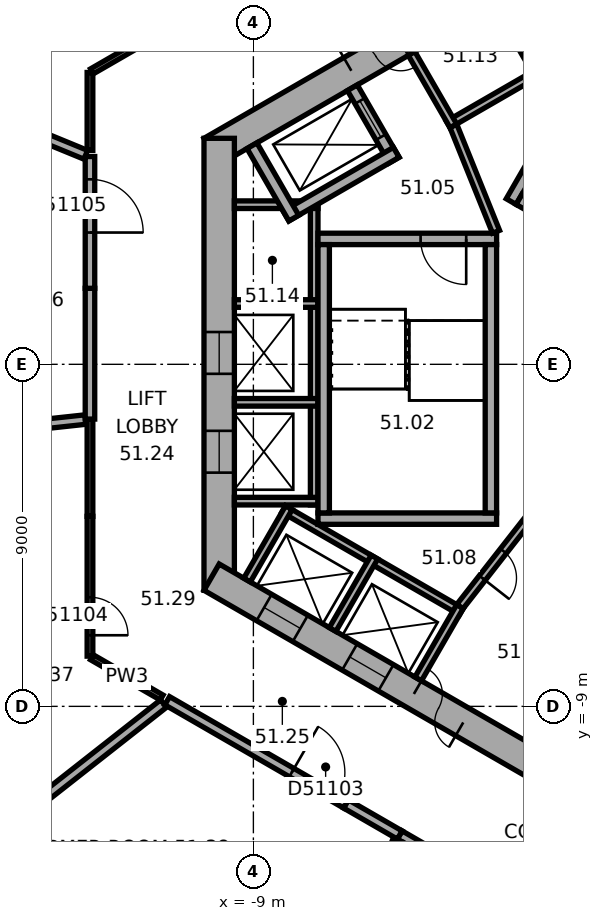
"""IFC4 building model, lengths in metres.
Left out: names, types, materials, properties, quantities, classifications, styles, units other than length and angle.
Written with IfcOpenShell. Run it as: python <this file> out.ifc"""

import sys

from ifc_helpers import new_model, si_unit, direction, frame, frame_2d, origin, place, context, subcontext, project, spatial, rectangle, extrude, element, fill, save


model = new_model("IFC4")
c1 = context("Model", 3, precision=1e-05, world=origin(), true_north=direction((0.0, 1.0)))
c2 = subcontext(c1, "Body", "Model", "MODEL_VIEW")
j1 = project(units=[si_unit("LENGTHUNIT", "METRE"), si_unit("PLANEANGLEUNIT", "RADIAN")], contexts=[c1])
p1 = place(None, origin())
s1 = spatial("IfcSite", under=j1, at=p1, CompositionType="ELEMENT")
p2 = place(p1, origin())
s2 = spatial("IfcBuilding", under=s1, at=p2, CompositionType="ELEMENT")
p3 = place(p2, frame((0.0, 0.0, 205.8)))
s3 = spatial("IfcBuildingStorey", under=s2, at=p3, CompositionType="ELEMENT", Elevation=205.8)
p4 = place(p3, frame((0.2, 11.547, 0.0), z_axis=(0.0, 0.0, 1.0), x_axis=(-0.866023897231, -0.500002609418, 0.0)))
e1 = element("IfcWall", 1, at=p4, inside=s3, PredefinedType="SHEAR", context=c2, shape_type="SweptSolid", body=[
    extrude(rectangle(XDim=11.894, YDim=0.8, at=frame_2d((5.947, 0.0))), origin(), (0.0, 0.0, 1.0), 4.8),
])
p5 = place(p4, frame((6.147, 0.0, 0.0)))
e2 = element("IfcOpeningElement", 2, at=p5, cuts=e1, PredefinedType="OPENING", context=c2, shape_type="SweptSolid", body=[
    extrude(rectangle(XDim=1.5, YDim=2.1, at=frame_2d((0.75, 1.05))), frame((0.0, 0.41, 0.0), z_axis=(0.0, -1.0, 0.0), x_axis=(1.0, 0.0, 0.0)), (0.0, 0.0, 1.0), 0.82),
])
p6 = place(p4, frame((1.697, 0.0, 0.0)))
e3 = element("IfcOpeningElement", 3, at=p6, cuts=e1, PredefinedType="OPENING", context=c2, shape_type="SweptSolid", body=[
    extrude(rectangle(XDim=0.9, YDim=2.1, at=frame_2d((0.45, 1.05))), frame((0.0, 0.41, 0.0), z_axis=(0.0, -1.0, 0.0), x_axis=(1.0, 0.0, 0.0)), (0.0, 0.0, 1.0), 0.82),
])
p7 = place(p4, frame((4.297, 0.0, 0.0)))
e4 = element("IfcOpeningElement", 4, at=p7, cuts=e1, PredefinedType="OPENING", context=c2, shape_type="SweptSolid", body=[
    extrude(rectangle(XDim=0.9, YDim=2.1, at=frame_2d((0.45, 1.05))), frame((0.0, 0.41, 0.0), z_axis=(0.0, -1.0, 0.0), x_axis=(1.0, 0.0, 0.0)), (0.0, 0.0, 1.0), 0.82),
])
p8 = place(p3, frame((-9.9, 5.947, 0.0), z_axis=(0.0, 0.0, 1.0), x_axis=(0.0, -1.0, 0.0)))
e5 = element("IfcWall", 5, at=p8, inside=s3, PredefinedType="SHEAR", context=c2, shape_type="SweptSolid", body=[
    extrude(rectangle(XDim=11.894, YDim=0.8, at=frame_2d((5.947, 0.0))), origin(), (0.0, 0.0, 1.0), 4.8),
])
p9 = place(p8, frame((5.097, 0.0, 0.0)))
e6 = element("IfcOpeningElement", 6, at=p9, cuts=e5, PredefinedType="OPENING", context=c2, shape_type="SweptSolid", body=[
    extrude(rectangle(XDim=1.1, YDim=2.1, at=frame_2d((0.55, 1.05))), frame((0.0, 0.41, 0.0), z_axis=(0.0, -1.0, 0.0), x_axis=(1.0, 0.0, 0.0)), (0.0, 0.0, 1.0), 0.82),
])
p10 = place(p8, frame((7.697, 0.0, 0.0)))
e7 = element("IfcOpeningElement", 7, at=p10, cuts=e5, PredefinedType="OPENING", context=c2, shape_type="SweptSolid", body=[
    extrude(rectangle(XDim=1.1, YDim=2.1, at=frame_2d((0.55, 1.05))), frame((0.0, 0.41, 0.0), z_axis=(0.0, -1.0, 0.0), x_axis=(1.0, 0.0, 0.0)), (0.0, 0.0, 1.0), 0.82),
])
p11 = place(p3, frame((-10.1, -5.6, 0.0), z_axis=(0.0, 0.0, 1.0), x_axis=(0.866023897231, -0.500002609418, 0.0)))
e8 = element("IfcWall", 8, at=p11, inside=s3, PredefinedType="SHEAR", context=c2, shape_type="SweptSolid", body=[
    extrude(rectangle(XDim=11.894, YDim=0.8, at=frame_2d((5.947, 0.0))), origin(), (0.0, 0.0, 1.0), 4.8),
])
p12 = place(p11, frame((6.147, 0.0, 0.0)))
e9 = element("IfcOpeningElement", 9, at=p12, cuts=e8, PredefinedType="OPENING", context=c2, shape_type="SweptSolid", body=[
    extrude(rectangle(XDim=1.5, YDim=2.1, at=frame_2d((0.75, 1.05))), frame((0.0, 0.41, 0.0), z_axis=(0.0, -1.0, 0.0), x_axis=(1.0, 0.0, 0.0)), (0.0, 0.0, 1.0), 0.82),
])
p13 = place(p11, frame((1.597, 0.0, 0.0)))
e10 = element("IfcOpeningElement", 10, at=p13, cuts=e8, PredefinedType="OPENING", context=c2, shape_type="SweptSolid", body=[
    extrude(rectangle(XDim=1.1, YDim=2.1, at=frame_2d((0.55, 1.05))), frame((0.0, 0.41, 0.0), z_axis=(0.0, -1.0, 0.0), x_axis=(1.0, 0.0, 0.0)), (0.0, 0.0, 1.0), 0.82),
])
p14 = place(p11, frame((4.197, 0.0, 0.0)))
e11 = element("IfcOpeningElement", 11, at=p14, cuts=e8, PredefinedType="OPENING", context=c2, shape_type="SweptSolid", body=[
    extrude(rectangle(XDim=1.1, YDim=2.1, at=frame_2d((0.55, 1.05))), frame((0.0, 0.41, 0.0), z_axis=(0.0, -1.0, 0.0), x_axis=(1.0, 0.0, 0.0)), (0.0, 0.0, 1.0), 0.82),
])
p15 = place(p3, frame((0.803, 9.009, 0.0), z_axis=(0.0, 0.0, 1.0), x_axis=(-0.866028230842, -0.499995103361, 0.0)))
e12 = element("IfcWall", 12, at=p15, inside=s3, PredefinedType="PARTITIONING", context=c2, shape_type="SweptSolid", body=[
    extrude(rectangle(XDim=5.4, YDim=0.2, at=frame_2d((2.7, 0.0))), origin(), (0.0, 0.0, 1.0), 4.52),
])
for number, where, z_axis, x_axis in (
    (13, (-1.485, 7.572, 0.0), (0.0, 0.0, 1.0), (-0.5, 0.866, 0.0)),
    (14, (-3.737, 6.272, 0.0), (0.0, 0.0, 1.0), (-0.5, 0.866, 0.0)),
):
    element("IfcWall", number, at=place(p3, frame(where, z_axis=z_axis, x_axis=x_axis)), inside=s3, PredefinedType="PARTITIONING", context=c2, shape_type="SweptSolid", body=[
        extrude(rectangle(XDim=2.2, YDim=0.2, at=frame_2d((1.1, 0.0))), origin(), (0.0, 0.0, 1.0), 4.52),
    ])
p16 = place(p3, frame((-7.4, 4.3, 0.0), z_axis=(0.0, 0.0, 1.0), x_axis=(0.0, -1.0, 0.0)))
e15 = element("IfcWall", 15, at=p16, inside=s3, PredefinedType="PARTITIONING", context=c2, shape_type="SweptSolid", body=[
    extrude(rectangle(XDim=8.0, YDim=0.2, at=frame_2d((4.0, 0.0))), origin(), (0.0, 0.0, 1.0), 4.52),
])
for number, where, z_axis, x_axis in (
    (16, (-7.3, 4.2, 0.0), (0.0, 0.0, 1.0), (-1.0, 0.0, 0.0)),
    (17, (-7.3, 1.6, 0.0), (0.0, 0.0, 1.0), (-1.0, 0.0, 0.0)),
    (18, (-7.3, -1.0, 0.0), (0.0, 0.0, 1.0), (-1.0, 0.0, 0.0)),
    (19, (-7.3, -3.6, 0.0), (0.0, 0.0, 1.0), (-1.0, 0.0, 0.0)),
):
    element("IfcWall", number, at=place(p3, frame(where, z_axis=z_axis, x_axis=x_axis)), inside=s3, PredefinedType="PARTITIONING", context=c2, shape_type="SweptSolid", body=[
        extrude(rectangle(XDim=2.2, YDim=0.2, at=frame_2d((1.1, 0.0))), origin(), (0.0, 0.0, 1.0), 4.52),
    ])
p17 = place(p3, frame((-8.203, -3.809, 0.0), z_axis=(0.0, 0.0, 1.0), x_axis=(0.866028230842, -0.499995103361, 0.0)))
e20 = element("IfcWall", 20, at=p17, inside=s3, PredefinedType="PARTITIONING", context=c2, shape_type="SweptSolid", body=[
    extrude(rectangle(XDim=5.4, YDim=0.2, at=frame_2d((2.7, 0.0))), origin(), (0.0, 0.0, 1.0), 4.52),
])
for number, where, z_axis, x_axis in (
    (21, (-8.067, -3.772, 0.0), (0.0, 0.0, 1.0), (-0.5, -0.866, 0.0)),
    (22, (-5.815, -5.072, 0.0), (0.0, 0.0, 1.0), (-0.5, -0.866, 0.0)),
):
    element("IfcWall", number, at=place(p3, frame(where, z_axis=z_axis, x_axis=x_axis)), inside=s3, PredefinedType="PARTITIONING", context=c2, shape_type="SweptSolid", body=[
        extrude(rectangle(XDim=2.2, YDim=0.2, at=frame_2d((1.1, 0.0))), origin(), (0.0, 0.0, 1.0), 4.52),
    ])
p18 = place(p3, frame((-3.563, -6.372, 0.0), z_axis=(0.0, 0.0, 1.0), x_axis=(-0.499994660107, -0.866028486751, 0.0)))
e23 = element("IfcWall", 23, at=p18, inside=s3, PredefinedType="PARTITIONING", context=c2, shape_type="SweptSolid", body=[
    extrude(rectangle(XDim=2.2, YDim=0.2, at=frame_2d((1.1, 0.0))), origin(), (0.0, 0.0, 1.0), 4.52),
])
p19 = place(p3, frame((-2.216, 4.282, 0.0), z_axis=(0.0, 0.0, 1.0), x_axis=(0.499977259774, 0.866038532462, 0.0)))
e24 = element("IfcWall", 24, at=p19, inside=s3, PredefinedType="SHEAR", context=c2, shape_type="SweptSolid", body=[
    extrude(rectangle(XDim=4.7, YDim=0.3, at=frame_2d((2.35, 0.0))), origin(), (0.0, 0.0, 1.0), 4.52),
])
p20 = place(p3, frame((4.103, 0.807, 0.0), z_axis=(0.0, 0.0, 1.0), x_axis=(-0.866027801685, 0.499995846692, 0.0)))
e25 = element("IfcWall", 25, at=p20, inside=s3, PredefinedType="SHEAR", context=c2, shape_type="SweptSolid", body=[
    extrude(rectangle(XDim=7.06, YDim=0.3, at=frame_2d((3.53, 0.0))), origin(), (0.0, 0.0, 1.0), 4.52),
])
p21 = place(p3, frame((-2.6, 3.3, 0.0), z_axis=(0.0, 0.0, 1.0), x_axis=(-1.0, 0.0, 0.0)))
e26 = element("IfcWall", 26, at=p21, inside=s3, PredefinedType="SHEAR", context=c2, shape_type="SweptSolid", body=[
    extrude(rectangle(XDim=4.7, YDim=0.3, at=frame_2d((2.35, 0.0))), origin(), (0.0, 0.0, 1.0), 4.52),
])
p22 = place(p21, frame((0.8, 0.0, 0.0)))
e27 = element("IfcOpeningElement", 27, at=p22, cuts=e26, PredefinedType="OPENING", context=c2, shape_type="SweptSolid", body=[
    extrude(rectangle(XDim=1.2, YDim=2.1, at=frame_2d((0.6, 1.05))), frame((0.0, 0.16, 0.0), z_axis=(0.0, -1.0, 0.0), x_axis=(1.0, 0.0, 0.0)), (0.0, 0.0, 1.0), 0.32),
])
p23 = place(p3, frame((-2.6, -4.06, 0.0), z_axis=(0.0, 0.0, 1.0), x_axis=(-1.0, 0.0, 0.0)))
e28 = element("IfcWall", 28, at=p23, inside=s3, PredefinedType="SHEAR", context=c2, shape_type="SweptSolid", body=[
    extrude(rectangle(XDim=4.7, YDim=0.3, at=frame_2d((2.35, 0.0))), origin(), (0.0, 0.0, 1.0), 4.52),
])
for number, where, z_axis, x_axis in (
    (29, (-2.75, 3.15, 0.0), (0.0, 0.0, 1.0), (0.0, -1.0, 0.0)),
    (30, (-7.15, 3.15, 0.0), (0.0, 0.0, 1.0), (0.0, -1.0, 0.0)),
):
    element("IfcWall", number, at=place(p3, frame(where, z_axis=z_axis, x_axis=x_axis)), inside=s3, PredefinedType="SHEAR", context=c2, shape_type="SweptSolid", body=[
        extrude(rectangle(XDim=7.06, YDim=0.3, at=frame_2d((3.53, 0.0))), origin(), (0.0, 0.0, 1.0), 4.52),
    ])
p24 = place(p3, frame((-5.295, 5.372, 0.0), z_axis=(0.0, 0.0, 1.0), x_axis=(-0.500077893725, 0.86598042715, 0.0)))
e31 = element("IfcWall", 31, at=p24, inside=s3, PredefinedType="SHEAR", context=c2, shape_type="SweptSolid", body=[
    extrude(rectangle(XDim=2.2, YDim=0.3, at=frame_2d((1.1, 0.0))), origin(), (0.0, 0.0, 1.0), 4.52),
])
p25 = place(p24, frame((0.7, 0.0, 0.0)))
e32 = element("IfcOpeningElement", 32, at=p25, cuts=e31, PredefinedType="OPENING", context=c2, shape_type="SweptSolid", body=[
    extrude(rectangle(XDim=1.1, YDim=2.1, at=frame_2d((0.55, 1.05))), frame((0.0, 0.16, 0.0), z_axis=(0.0, -1.0, 0.0), x_axis=(1.0, 0.0, 0.0)), (0.0, 0.0, 1.0), 0.32),
])
p26 = place(p3, frame((-5.24, 5.577, 0.0), z_axis=(0.0, 0.0, 1.0), x_axis=(-0.866014461049, -0.500018952895, 0.0)))
e33 = element("IfcWall", 33, at=p26, inside=s3, PredefinedType="SHEAR", context=c2, shape_type="SweptSolid", body=[
    extrude(rectangle(XDim=3.35, YDim=0.3, at=frame_2d((1.675, 0.0))), origin(), (0.0, 0.0, 1.0), 4.52),
])
p27 = place(p3, frame((-7.937, 3.847, 0.0), z_axis=(0.0, 0.0, 1.0), x_axis=(-0.50002983664, 0.866008176907, 0.0)))
e34 = element("IfcWall", 34, at=p27, inside=s3, PredefinedType="SHEAR", context=c2, shape_type="SweptSolid", body=[
    extrude(rectangle(XDim=2.2, YDim=0.3, at=frame_2d((1.1, 0.0))), origin(), (0.0, 0.0, 1.0), 4.52),
])
p28 = place(p3, frame((-2.615, 3.487, 0.0), z_axis=(0.0, 0.0, 1.0), x_axis=(-0.373576831041, 0.92759924068, 0.0)))
e35 = element("IfcWall", 35, at=p28, inside=s3, PredefinedType="PARTITIONING", context=c2, shape_type="SweptSolid", body=[
    extrude(rectangle(XDim=3.002, YDim=0.2, at=frame_2d((1.501, 0.0))), origin(), (0.0, 0.0, 1.0), 4.52),
])
p29 = place(p3, frame((-1.712, -4.008, 0.0), z_axis=(0.0, 0.0, 1.0), x_axis=(-0.616549420702, -0.787316208287, 0.0)))
e36 = element("IfcWall", 36, at=p29, inside=s3, PredefinedType="PARTITIONING", context=c2, shape_type="SweptSolid", body=[
    extrude(rectangle(XDim=3.002, YDim=0.2, at=frame_2d((1.501, 0.0))), origin(), (0.0, 0.0, 1.0), 4.52),
])
p30 = place(p29, frame((1.15, 0.0, 0.0)))
e37 = element("IfcOpeningElement", 37, at=p30, cuts=e36, PredefinedType="OPENING", context=c2, shape_type="SweptSolid", body=[
    extrude(rectangle(XDim=0.9, YDim=2.1, at=frame_2d((0.45, 1.05))), frame((0.0, 0.11, 0.0), z_axis=(0.0, -1.0, 0.0), x_axis=(1.0, 0.0, 0.0)), (0.0, 0.0, 1.0), 0.22),
])
p31 = place(p3, frame((-0.087, -15.308, 0.0), z_axis=(0.0, 0.0, 1.0), x_axis=(-0.866016588558, 0.50001526811, 0.0)))
e38 = element("IfcWall", 38, at=p31, inside=s3, PredefinedType="SOLIDWALL", context=c2, shape_type="SweptSolid", body=[
    extrude(rectangle(XDim=5.846, YDim=0.25, at=frame_2d((2.923, 0.0))), origin(), (0.0, 0.0, 1.0), 4.52),
])
p32 = place(p31, frame((0.55, 0.0, 0.0)))
e39 = element("IfcOpeningElement", 39, at=p32, cuts=e38, PredefinedType="OPENING", context=c2, shape_type="SweptSolid", body=[
    extrude(rectangle(XDim=1.4, YDim=2.1, at=frame_2d((0.7, 1.05))), frame((0.0, 0.135, 0.0), z_axis=(0.0, -1.0, 0.0), x_axis=(1.0, 0.0, 0.0)), (0.0, 0.0, 1.0), 0.27),
])
p33 = place(p3, frame((-5.203, -12.514, 0.0), z_axis=(0.0, 0.0, 1.0), x_axis=(-0.383964269763, -0.923347951503, 0.0)))
e40 = element("IfcWall", 40, at=p33, inside=s3, PredefinedType="SOLIDWALL", context=c2, shape_type="SweptSolid", body=[
    extrude(rectangle(XDim=6.577, YDim=0.25, at=frame_2d((3.289, 0.0))), origin(), (0.0, 0.0, 1.0), 3.6),
])
p34 = place(p3, frame((-6.563, -11.568, 0.0), z_axis=(0.0, 0.0, 1.0), x_axis=(0.866026229868, -0.499998569178, 0.0)))
e41 = element("IfcWall", 41, at=p34, inside=s3, PredefinedType="SOLIDWALL", context=c2, shape_type="SweptSolid", body=[
    extrude(rectangle(XDim=1.633, YDim=0.25, at=frame_2d((0.816, 0.0))), origin(), (0.0, 0.0, 1.0), 4.52),
])
p35 = place(p3, frame((-11.363, -8.926, 0.0), z_axis=(0.0, 0.0, 1.0), x_axis=(-0.786388390319, -0.617732385075, 0.0)))
e42 = element("IfcWall", 42, at=p35, inside=s3, PredefinedType="SOLIDWALL", context=c2, shape_type="SweptSolid", body=[
    extrude(rectangle(XDim=4.716, YDim=0.25, at=frame_2d((2.358, 0.0))), origin(), (0.0, 0.0, 1.0), 3.6),
])
p36 = place(p3, frame((-11.269, -8.852, 0.0), z_axis=(0.0, 0.0, 1.0), x_axis=(0.866019457076, -0.500010299859, 0.0)))
e43 = element("IfcWall", 43, at=p36, inside=s3, PredefinedType="SOLIDWALL", context=c2, shape_type="SweptSolid", body=[
    extrude(rectangle(XDim=5.433, YDim=0.25, at=frame_2d((2.717, 0.0))), origin(), (0.0, 0.0, 1.0), 4.52),
])
p37 = place(p36, frame((3.783, 0.0, 0.0)))
e44 = element("IfcOpeningElement", 44, at=p37, cuts=e43, PredefinedType="OPENING", context=c2, shape_type="SweptSolid", body=[
    extrude(rectangle(XDim=1.4, YDim=2.1, at=frame_2d((0.7, 1.05))), frame((0.0, 0.135, 0.0), z_axis=(0.0, -1.0, 0.0), x_axis=(1.0, 0.0, 0.0)), (0.0, 0.0, 1.0), 0.27),
])
p38 = place(p3, frame((-13.248, -7.709, 0.0), z_axis=(0.0, 0.0, 1.0), x_axis=(0.866093487018, -0.499882057835, 0.0)))
e45 = element("IfcWall", 45, at=p38, inside=s3, PredefinedType="PARTITIONING", context=c2, shape_type="SweptSolid", body=[
    extrude(rectangle(XDim=2.119, YDim=0.15, at=frame_2d((1.059, 0.0))), origin(), (0.0, 0.0, 1.0), 4.52),
])
p39 = place(p3, frame((-13.3, -7.679, 0.0), z_axis=(0.0, 0.0, 1.0), x_axis=(0.0, 1.0, 0.0)))
e46 = element("IfcWall", 46, at=p39, inside=s3, PredefinedType="PARTITIONING", context=c2, shape_type="SweptSolid", body=[
    extrude(rectangle(XDim=3.679, YDim=0.15, at=frame_2d((1.839, 0.0))), origin(), (0.0, 0.0, 1.0), 4.52),
])
p40 = place(p39, frame((0.55, 0.0, 0.0)))
e47 = element("IfcOpeningElement", 47, at=p40, cuts=e46, PredefinedType="OPENING", context=c2, shape_type="SweptSolid", body=[
    extrude(rectangle(XDim=1.0, YDim=2.1, at=frame_2d((0.5, 1.05))), frame((0.0, 0.085, 0.0), z_axis=(0.0, -1.0, 0.0), x_axis=(1.0, 0.0, 0.0)), (0.0, 0.0, 1.0), 0.17),
])
p41 = place(p3, frame((-13.3, -4.0, 0.0), z_axis=(0.0, 0.0, 1.0), x_axis=(0.0, 1.0, 0.0)))
e48 = element("IfcWall", 48, at=p41, inside=s3, PredefinedType="PARTITIONING", context=c2, shape_type="SweptSolid", body=[
    extrude(rectangle(XDim=2.56, YDim=0.15, at=frame_2d((1.28, 0.0))), origin(), (0.0, 0.0, 1.0), 4.52),
])
p42 = place(p3, frame((-14.501, -1.571, 0.0), z_axis=(0.0, 0.0, 1.0), x_axis=(0.994183696144, 0.107697624498, 0.0)))
e49 = element("IfcWall", 49, at=p42, inside=s3, PredefinedType="SOLIDWALL", context=c2, shape_type="SweptSolid", body=[
    extrude(rectangle(XDim=1.088, YDim=0.25, at=frame_2d((0.544, 0.0))), origin(), (0.0, 0.0, 1.0), 3.6),
])
p43 = place(p3, frame((-13.3, -1.44, 0.0), z_axis=(0.0, 0.0, 1.0), x_axis=(0.0, 1.0, 0.0)))
e50 = element("IfcWall", 50, at=p43, inside=s3, PredefinedType="SOLIDWALL", context=c2, shape_type="SweptSolid", body=[
    extrude(rectangle(XDim=3.44, YDim=0.25, at=frame_2d((1.72, 0.0))), origin(), (0.0, 0.0, 1.0), 4.52),
])
p44 = place(p3, frame((-13.3, 2.0, 0.0), z_axis=(0.0, 0.0, 1.0), x_axis=(0.0, 1.0, 0.0)))
e51 = element("IfcWall", 51, at=p44, inside=s3, PredefinedType="SOLIDWALL", context=c2, shape_type="SweptSolid", body=[
    extrude(rectangle(XDim=3.468, YDim=0.25, at=frame_2d((1.734, 0.0))), origin(), (0.0, 0.0, 1.0), 4.52),
])
p45 = place(p44, frame((1.468, 0.0, 0.0)))
e52 = element("IfcOpeningElement", 52, at=p45, cuts=e51, PredefinedType="OPENING", context=c2, shape_type="SweptSolid", body=[
    extrude(rectangle(XDim=1.4, YDim=2.1, at=frame_2d((0.7, 1.05))), frame((0.0, 0.135, 0.0), z_axis=(0.0, -1.0, 0.0), x_axis=(1.0, 0.0, 0.0)), (0.0, 0.0, 1.0), 0.27),
])
p46 = place(p3, frame((-13.3, 5.627, 0.0), z_axis=(0.0, 0.0, 1.0), x_axis=(0.0, 1.0, 0.0)))
e53 = element("IfcWall", 53, at=p46, inside=s3, PredefinedType="PARTITIONING", context=c2, shape_type="SweptSolid", body=[
    extrude(rectangle(XDim=2.052, YDim=0.15, at=frame_2d((1.026, 0.0))), origin(), (0.0, 0.0, 1.0), 4.52),
])
p47 = place(p3, frame((-15.809, 6.499, 0.0), z_axis=(0.0, 0.0, 1.0), x_axis=(0.924968398932, -0.380044025052, 0.0)))
e54 = element("IfcWall", 54, at=p47, inside=s3, PredefinedType="SOLIDWALL", context=c2, shape_type="SweptSolid", body=[
    extrude(rectangle(XDim=2.593, YDim=0.25, at=frame_2d((1.296, 0.0))), origin(), (0.0, 0.0, 1.0), 3.6),
])
p48 = place(p3, frame((-8.15, 10.652, 0.0), z_axis=(0.0, 0.0, 1.0), x_axis=(-0.866047461757, -0.499961792524, 0.0)))
e55 = element("IfcWall", 55, at=p48, inside=s3, PredefinedType="PARTITIONING", context=c2, shape_type="SweptSolid", body=[
    extrude(rectangle(XDim=5.887, YDim=0.15, at=frame_2d((2.943, 0.0))), origin(), (0.0, 0.0, 1.0), 4.52),
])
p49 = place(p48, frame((0.65, 0.0, 0.0)))
e56 = element("IfcOpeningElement", 56, at=p49, cuts=e55, PredefinedType="OPENING", context=c2, shape_type="SweptSolid", body=[
    extrude(rectangle(XDim=1.0, YDim=2.1, at=frame_2d((0.5, 1.05))), frame((0.0, 0.085, 0.0), z_axis=(0.0, -1.0, 0.0), x_axis=(1.0, 0.0, 0.0)), (0.0, 0.0, 1.0), 0.17),
])
p50 = place(p5, origin())
e57 = element("IfcDoor", 57, at=p50, inside=s3, OperationType="DOUBLE_DOOR_SINGLE_SWING", PredefinedType="DOOR", context=c2, shape_type="SweptSolid", body=[
    extrude(rectangle(XDim=1.5, YDim=2.1, at=frame_2d((0.75, 1.05))), frame((0.0, 0.025, 0.0), z_axis=(0.0, -1.0, 0.0), x_axis=(1.0, 0.0, 0.0)), (0.0, 0.0, 1.0), 0.05),
])
fill(e2, e57)
p51 = place(p12, origin())
e58 = element("IfcDoor", 58, at=p51, inside=s3, OperationType="DOUBLE_DOOR_SINGLE_SWING", PredefinedType="DOOR", context=c2, shape_type="SweptSolid", body=[
    extrude(rectangle(XDim=1.5, YDim=2.1, at=frame_2d((0.75, 1.05))), frame((0.0, 0.025, 0.0), z_axis=(0.0, -1.0, 0.0), x_axis=(1.0, 0.0, 0.0)), (0.0, 0.0, 1.0), 0.05),
])
fill(e9, e58)
p52 = place(p22, origin())
e59 = element("IfcDoor", 59, at=p52, inside=s3, OperationType="SINGLE_SWING_RIGHT", PredefinedType="DOOR", context=c2, shape_type="SweptSolid", body=[
    extrude(rectangle(XDim=1.2, YDim=2.1, at=frame_2d((0.6, 1.05))), frame((0.0, 0.025, 0.0), z_axis=(0.0, -1.0, 0.0), x_axis=(1.0, 0.0, 0.0)), (0.0, 0.0, 1.0), 0.05),
])
fill(e27, e59)
p53 = place(p30, origin())
e60 = element("IfcDoor", 60, at=p53, inside=s3, OperationType="SINGLE_SWING_LEFT", PredefinedType="DOOR", context=c2, shape_type="SweptSolid", body=[
    extrude(rectangle(XDim=0.9, YDim=2.1, at=frame_2d((0.45, 1.05))), frame((0.0, 0.025, 0.0), z_axis=(0.0, -1.0, 0.0), x_axis=(1.0, 0.0, 0.0)), (0.0, 0.0, 1.0), 0.05),
])
fill(e37, e60)
p54 = place(p25, origin())
e61 = element("IfcDoor", 61, at=p54, inside=s3, OperationType="DOUBLE_DOOR_SLIDING", PredefinedType="DOOR", context=c2, shape_type="SweptSolid", body=[
    extrude(rectangle(XDim=1.1, YDim=2.1, at=frame_2d((0.55, 1.05))), frame((0.0, 0.025, 0.0), z_axis=(0.0, -1.0, 0.0), x_axis=(1.0, 0.0, 0.0)), (0.0, 0.0, 1.0), 0.05),
])
fill(e32, e61)
p55 = place(p9, origin())
e62 = element("IfcDoor", 62, at=p55, inside=s3, OperationType="DOUBLE_DOOR_SLIDING", PredefinedType="DOOR", context=c2, shape_type="SweptSolid", body=[
    extrude(rectangle(XDim=1.1, YDim=2.1, at=frame_2d((0.55, 1.05))), frame((0.0, 0.025, 0.0), z_axis=(0.0, -1.0, 0.0), x_axis=(1.0, 0.0, 0.0)), (0.0, 0.0, 1.0), 0.05),
])
fill(e6, e62)
p56 = place(p10, origin())
e63 = element("IfcDoor", 63, at=p56, inside=s3, OperationType="DOUBLE_DOOR_SLIDING", PredefinedType="DOOR", context=c2, shape_type="SweptSolid", body=[
    extrude(rectangle(XDim=1.1, YDim=2.1, at=frame_2d((0.55, 1.05))), frame((0.0, 0.025, 0.0), z_axis=(0.0, -1.0, 0.0), x_axis=(1.0, 0.0, 0.0)), (0.0, 0.0, 1.0), 0.05),
])
fill(e7, e63)
p57 = place(p13, origin())
e64 = element("IfcDoor", 64, at=p57, inside=s3, OperationType="DOUBLE_DOOR_SLIDING", PredefinedType="DOOR", context=c2, shape_type="SweptSolid", body=[
    extrude(rectangle(XDim=1.1, YDim=2.1, at=frame_2d((0.55, 1.05))), frame((0.0, 0.025, 0.0), z_axis=(0.0, -1.0, 0.0), x_axis=(1.0, 0.0, 0.0)), (0.0, 0.0, 1.0), 0.05),
])
fill(e10, e64)
p58 = place(p14, origin())
e65 = element("IfcDoor", 65, at=p58, inside=s3, OperationType="DOUBLE_DOOR_SLIDING", PredefinedType="DOOR", context=c2, shape_type="SweptSolid", body=[
    extrude(rectangle(XDim=1.1, YDim=2.1, at=frame_2d((0.55, 1.05))), frame((0.0, 0.025, 0.0), z_axis=(0.0, -1.0, 0.0), x_axis=(1.0, 0.0, 0.0)), (0.0, 0.0, 1.0), 0.05),
])
fill(e11, e65)
p59 = place(p37, origin())
e66 = element("IfcDoor", 66, at=p59, inside=s3, OperationType="SINGLE_SWING_LEFT", PredefinedType="DOOR", context=c2, shape_type="SweptSolid", body=[
    extrude(rectangle(XDim=1.4, YDim=2.1, at=frame_2d((0.7, 1.05))), frame((0.0, 0.025, 0.0), z_axis=(0.0, -1.0, 0.0), x_axis=(1.0, 0.0, 0.0)), (0.0, 0.0, 1.0), 0.05),
])
fill(e44, e66)
p60 = place(p40, origin())
e67 = element("IfcDoor", 67, at=p60, inside=s3, OperationType="SINGLE_SWING_LEFT", PredefinedType="DOOR", context=c2, shape_type="SweptSolid", body=[
    extrude(rectangle(XDim=1.0, YDim=2.1, at=frame_2d((0.5, 1.05))), frame((0.0, 0.025, 0.0), z_axis=(0.0, -1.0, 0.0), x_axis=(1.0, 0.0, 0.0)), (0.0, 0.0, 1.0), 0.05),
])
fill(e47, e67)
p61 = place(p45, origin())
e68 = element("IfcDoor", 68, at=p61, inside=s3, OperationType="SINGLE_SWING_LEFT", PredefinedType="DOOR", context=c2, shape_type="SweptSolid", body=[
    extrude(rectangle(XDim=1.4, YDim=2.1, at=frame_2d((0.7, 1.05))), frame((0.0, 0.025, 0.0), z_axis=(0.0, -1.0, 0.0), x_axis=(1.0, 0.0, 0.0)), (0.0, 0.0, 1.0), 0.05),
])
fill(e52, e68)
save(model, sys.argv[1])
